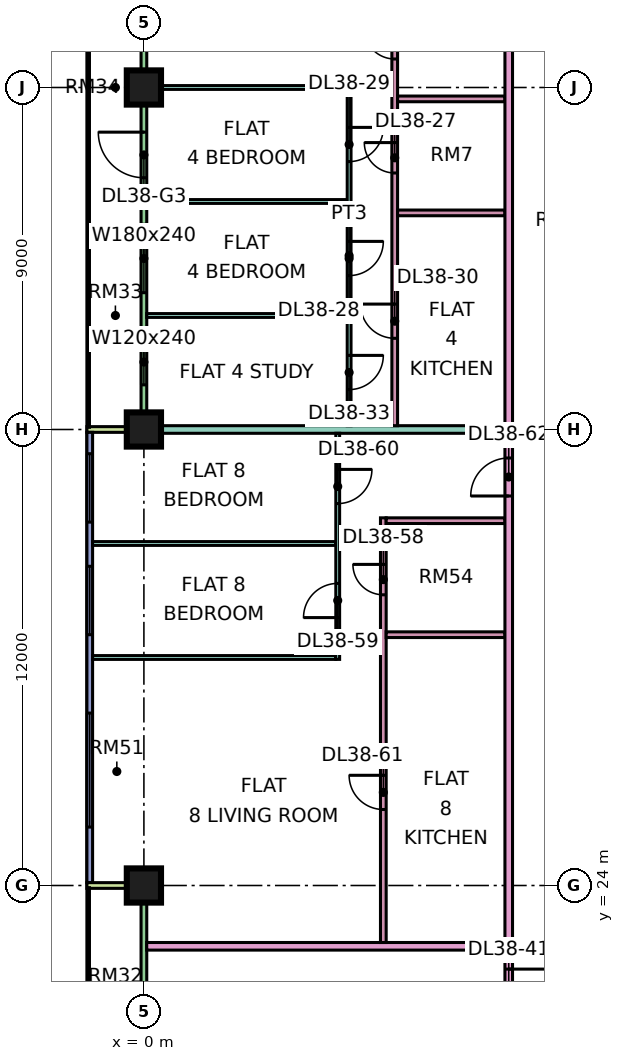
"""IFC4 building model, lengths in metres.
Left out: names, types, materials, properties, quantities, classifications, styles, units other than length and angle.
Written with IfcOpenShell. Run it as: python <this file> out.ifc"""

import sys

from ifc_helpers import new_model, si_unit, direction, frame, frame_2d, origin, origin_2d, place, context, subcontext, project, spatial, rectangle, extrude, element, fill, save


model = new_model("IFC4")
c1 = context("Model", 3, precision=1e-05, world=origin(), true_north=direction((0.0, 1.0)))
c2 = subcontext(c1, "Body", "Model", "MODEL_VIEW")
j1 = project(units=[si_unit("LENGTHUNIT", "METRE"), si_unit("PLANEANGLEUNIT", "RADIAN")], contexts=[c1])
p1 = place(None, origin())
s1 = spatial("IfcSite", under=j1, at=p1, CompositionType="ELEMENT")
p2 = place(p1, origin())
s2 = spatial("IfcBuilding", under=s1, at=p2, CompositionType="ELEMENT")
p3 = place(p2, frame((0.0, 0.0, 168.65)))
s3 = spatial("IfcBuildingStorey", under=s2, at=p3, CompositionType="ELEMENT", Elevation=168.65)
p4 = place(p3, frame((0.0, 24.0, 0.0), z_axis=(0.0, 0.0, 1.0), x_axis=(1.0, 0.0, 0.0)))
e1 = element("IfcColumn", 1, at=p4, inside=s3, PredefinedType="COLUMN", context=c2, shape_type="SweptSolid", body=[
    extrude(rectangle(XDim=0.9, YDim=0.9, at=origin_2d()), origin(), (0.0, 0.0, 1.0), 3.75),
])
p5 = place(p3, frame((0.0, 36.0, 0.0), z_axis=(0.0, 0.0, 1.0), x_axis=(1.0, 0.0, 0.0)))
e2 = element("IfcColumn", 2, at=p5, inside=s3, PredefinedType="COLUMN", context=c2, shape_type="SweptSolid", body=[
    extrude(rectangle(XDim=0.9, YDim=0.9, at=origin_2d()), origin(), (0.0, 0.0, 1.0), 3.75),
])
p6 = place(p3, frame((0.0, 45.0, 0.0), z_axis=(0.0, 0.0, 1.0), x_axis=(1.0, 0.0, 0.0)))
e3 = element("IfcColumn", 3, at=p6, inside=s3, PredefinedType="COLUMN", context=c2, shape_type="SweptSolid", body=[
    extrude(rectangle(XDim=0.9, YDim=0.9, at=origin_2d()), origin(), (0.0, 0.0, 1.0), 3.75),
])
p7 = place(p3, frame((0.0, 47.925, 0.0), z_axis=(0.0, 0.0, 1.0), x_axis=(0.0, -1.0, 0.0)))
e4 = element("IfcWall", 4, at=p7, inside=s3, PredefinedType="SOLIDWALL", context=c2, shape_type="SweptSolid", body=[
    extrude(rectangle(XDim=11.85, YDim=0.15, at=frame_2d((5.925, 0.0))), origin(), (0.0, 0.0, 1.0), 3.35),
])
p8 = place(p7, frame((0.587, 0.0, 0.45)))
e5 = element("IfcOpeningElement", 5, at=p8, cuts=e4, PredefinedType="OPENING", context=c2, shape_type="SweptSolid", body=[
    extrude(rectangle(XDim=1.2, YDim=2.4, at=frame_2d((0.6, 1.2))), frame((0.0, 0.085, 0.0), z_axis=(0.0, -1.0, 0.0), x_axis=(1.0, 0.0, 0.0)), (0.0, 0.0, 1.0), 0.17),
])
p9 = place(p7, frame((4.1, 0.0, 0.0)))
e6 = element("IfcOpeningElement", 6, at=p9, cuts=e4, PredefinedType="OPENING", context=c2, shape_type="SweptSolid", body=[
    extrude(rectangle(XDim=1.2, YDim=2.4, at=frame_2d((0.6, 1.2))), frame((0.0, 0.085, 0.0), z_axis=(0.0, -1.0, 0.0), x_axis=(1.0, 0.0, 0.0)), (0.0, 0.0, 1.0), 0.17),
])
p10 = place(p7, frame((6.525, 0.0, 0.45)))
e7 = element("IfcOpeningElement", 7, at=p10, cuts=e4, PredefinedType="OPENING", context=c2, shape_type="SweptSolid", body=[
    extrude(rectangle(XDim=1.8, YDim=2.4, at=frame_2d((0.9, 1.2))), frame((0.0, 0.085, 0.0), z_axis=(0.0, -1.0, 0.0), x_axis=(1.0, 0.0, 0.0)), (0.0, 0.0, 1.0), 0.17),
])
p11 = place(p7, frame((9.55, 0.0, 0.45)))
e8 = element("IfcOpeningElement", 8, at=p11, cuts=e4, PredefinedType="OPENING", context=c2, shape_type="SweptSolid", body=[
    extrude(rectangle(XDim=1.2, YDim=2.4, at=frame_2d((0.6, 1.2))), frame((0.0, 0.085, 0.0), z_axis=(0.0, -1.0, 0.0), x_axis=(1.0, 0.0, 0.0)), (0.0, 0.0, 1.0), 0.17),
])
p12 = place(p3, frame((-1.5, 36.0, 0.0), z_axis=(0.0, 0.0, 1.0), x_axis=(1.0, 0.0, 0.0)))
e9 = element("IfcWall", 9, at=p12, inside=s3, PredefinedType="SOLIDWALL", context=c2, shape_type="SweptSolid", body=[
    extrude(rectangle(XDim=1.5, YDim=0.15, at=frame_2d((0.75, 0.0))), origin(), (0.0, 0.0, 1.0), 3.35),
])
p13 = place(p3, frame((-1.425, 35.925, 0.0), z_axis=(0.0, 0.0, 1.0), x_axis=(0.0, -1.0, 0.0)))
e10 = element("IfcWall", 10, at=p13, inside=s3, PredefinedType="SOLIDWALL", context=c2, shape_type="SweptSolid", body=[
    extrude(rectangle(XDim=11.85, YDim=0.15, at=frame_2d((5.925, 0.0))), origin(), (0.0, 0.0, 1.0), 3.35),
])
p14 = place(p13, frame((0.562, 0.0, 0.45)))
e11 = element("IfcOpeningElement", 11, at=p14, cuts=e10, PredefinedType="OPENING", context=c2, shape_type="SweptSolid", body=[
    extrude(rectangle(XDim=1.8, YDim=2.4, at=frame_2d((0.9, 1.2))), frame((0.0, 0.085, 0.0), z_axis=(0.0, -1.0, 0.0), x_axis=(1.0, 0.0, 0.0)), (0.0, 0.0, 1.0), 0.17),
])
p15 = place(p13, frame((3.525, 0.0, 0.45)))
e12 = element("IfcOpeningElement", 12, at=p15, cuts=e10, PredefinedType="OPENING", context=c2, shape_type="SweptSolid", body=[
    extrude(rectangle(XDim=1.8, YDim=2.4, at=frame_2d((0.9, 1.2))), frame((0.0, 0.085, 0.0), z_axis=(0.0, -1.0, 0.0), x_axis=(1.0, 0.0, 0.0)), (0.0, 0.0, 1.0), 0.17),
])
p16 = place(p13, frame((7.387, 0.0, 0.45)))
e13 = element("IfcOpeningElement", 13, at=p16, cuts=e10, PredefinedType="OPENING", context=c2, shape_type="SweptSolid", body=[
    extrude(rectangle(XDim=3.0, YDim=2.4, at=frame_2d((1.5, 1.2))), frame((0.0, 0.085, 0.0), z_axis=(0.0, -1.0, 0.0), x_axis=(1.0, 0.0, 0.0)), (0.0, 0.0, 1.0), 0.17),
])
p17 = place(p3, frame((0.0, 23.925, 0.0), z_axis=(0.0, 0.0, 1.0), x_axis=(0.0, -1.0, 0.0)))
e14 = element("IfcWall", 14, at=p17, inside=s3, PredefinedType="SOLIDWALL", context=c2, shape_type="SweptSolid", body=[
    extrude(rectangle(XDim=11.35, YDim=0.15, at=frame_2d((5.675, 0.0))), origin(), (0.0, 0.0, 1.0), 3.35),
])
p18 = place(p17, frame((6.738, 0.0, 0.0)))
e15 = element("IfcOpeningElement", 15, at=p18, cuts=e14, PredefinedType="OPENING", context=c2, shape_type="SweptSolid", body=[
    extrude(rectangle(XDim=1.8, YDim=2.4, at=frame_2d((0.9, 1.2))), frame((0.0, 0.085, 0.0), z_axis=(0.0, -1.0, 0.0), x_axis=(1.0, 0.0, 0.0)), (0.0, 0.0, 1.0), 0.17),
])
p19 = place(p3, frame((-1.5, 24.0, 0.0), z_axis=(0.0, 0.0, 1.0), x_axis=(1.0, 0.0, 0.0)))
e16 = element("IfcWall", 16, at=p19, inside=s3, PredefinedType="SOLIDWALL", context=c2, shape_type="SweptSolid", body=[
    extrude(rectangle(XDim=1.5, YDim=0.15, at=frame_2d((0.75, 0.0))), origin(), (0.0, 0.0, 1.0), 3.35),
])
p20 = place(p3, frame((-1.351, 33.0, 0.0), z_axis=(0.0, 0.0, 1.0), x_axis=(1.0, 0.0, 0.0)))
e17 = element("IfcWall", 17, at=p20, inside=s3, PredefinedType="PARTITIONING", context=c2, shape_type="SweptSolid", body=[
    extrude(rectangle(XDim=6.401, YDim=0.1, at=frame_2d((3.201, 0.0))), origin(), (0.0, 0.0, 1.0), 3.35),
])
p21 = place(p3, frame((-1.35, 30.0, 0.0), z_axis=(0.0, 0.0, 1.0), x_axis=(1.0, 0.0, 0.0)))
e18 = element("IfcWall", 18, at=p21, inside=s3, PredefinedType="PARTITIONING", context=c2, shape_type="SweptSolid", body=[
    extrude(rectangle(XDim=6.4, YDim=0.1, at=frame_2d((3.2, 0.0))), origin(), (0.0, 0.0, 1.0), 3.35),
])
e19 = element("IfcWall", 19, at=p5, inside=s3, PredefinedType="PARTITIONING", context=c2, shape_type="SweptSolid", body=[
    extrude(rectangle(XDim=9.5, YDim=0.2, at=frame_2d((4.75, 0.0))), origin(), (0.0, 0.0, 1.0), 3.35),
])
p22 = place(p3, frame((0.074, 22.4, 0.0), z_axis=(0.0, 0.0, 1.0), x_axis=(1.0, 0.0, 0.0)))
e20 = element("IfcWall", 20, at=p22, inside=s3, PredefinedType="PARTITIONING", context=c2, shape_type="SweptSolid", body=[
    extrude(rectangle(XDim=9.426, YDim=0.2, at=frame_2d((4.713, 0.0))), origin(), (0.0, 0.0, 1.0), 3.35),
])
for number, where, z_axis, x_axis in (
    (21, (0.074, 39.0, 0.0), (0.0, 0.0, 1.0), (1.0, 0.0, 0.0)),
    (22, (0.074, 42.0, 0.0), (0.0, 0.0, 1.0), (1.0, 0.0, 0.0)),
    (23, (0.074, 45.0, 0.0), (0.0, 0.0, 1.0), (1.0, 0.0, 0.0)),
):
    element("IfcWall", number, at=place(p3, frame(where, z_axis=z_axis, x_axis=x_axis)), inside=s3, PredefinedType="PARTITIONING", context=c2, shape_type="SweptSolid", body=[
        extrude(rectangle(XDim=5.276, YDim=0.1, at=frame_2d((2.638, 0.0))), origin(), (0.0, 0.0, 1.0), 3.35),
    ])
p23 = place(p3, frame((5.1, 29.95, 0.0), z_axis=(0.0, 0.0, 1.0), x_axis=(0.0, 1.0, 0.0)))
e24 = element("IfcWall", 24, at=p23, inside=s3, PredefinedType="PARTITIONING", context=c2, shape_type="SweptSolid", body=[
    extrude(rectangle(XDim=5.95, YDim=0.1, at=frame_2d((2.975, 0.0))), origin(), (0.0, 0.0, 1.0), 3.35),
])
p24 = place(p23, frame((1.1, 0.0, 0.0)))
e25 = element("IfcOpeningElement", 25, at=p24, cuts=e24, PredefinedType="OPENING", context=c2, shape_type="SweptSolid", body=[
    extrude(rectangle(XDim=0.9, YDim=2.1, at=frame_2d((0.45, 1.05))), frame((0.0, 0.06, 0.0), z_axis=(0.0, -1.0, 0.0), x_axis=(1.0, 0.0, 0.0)), (0.0, 0.0, 1.0), 0.12),
])
p25 = place(p23, frame((4.1, 0.0, 0.0)))
e26 = element("IfcOpeningElement", 26, at=p25, cuts=e24, PredefinedType="OPENING", context=c2, shape_type="SweptSolid", body=[
    extrude(rectangle(XDim=0.9, YDim=2.1, at=frame_2d((0.45, 1.05))), frame((0.0, 0.06, 0.0), z_axis=(0.0, -1.0, 0.0), x_axis=(1.0, 0.0, 0.0)), (0.0, 0.0, 1.0), 0.12),
])
p26 = place(p3, frame((5.4, 36.1, 0.0), z_axis=(0.0, 0.0, 1.0), x_axis=(0.0, 1.0, 0.0)))
e27 = element("IfcWall", 27, at=p26, inside=s3, PredefinedType="PARTITIONING", context=c2, shape_type="SweptSolid", body=[
    extrude(rectangle(XDim=8.95, YDim=0.1, at=frame_2d((4.475, 0.0))), origin(), (0.0, 0.0, 1.0), 3.35),
])
p27 = place(p26, frame((3.95, 0.0, 0.0)))
e28 = element("IfcOpeningElement", 28, at=p27, cuts=e27, PredefinedType="OPENING", context=c2, shape_type="SweptSolid", body=[
    extrude(rectangle(XDim=0.9, YDim=2.1, at=frame_2d((0.45, 1.05))), frame((0.0, 0.06, 0.0), z_axis=(0.0, -1.0, 0.0), x_axis=(1.0, 0.0, 0.0)), (0.0, 0.0, 1.0), 0.12),
])
p28 = place(p26, frame((6.95, 0.0, 0.0)))
e29 = element("IfcOpeningElement", 29, at=p28, cuts=e27, PredefinedType="OPENING", context=c2, shape_type="SweptSolid", body=[
    extrude(rectangle(XDim=0.9, YDim=2.1, at=frame_2d((0.45, 1.05))), frame((0.0, 0.06, 0.0), z_axis=(0.0, -1.0, 0.0), x_axis=(1.0, 0.0, 0.0)), (0.0, 0.0, 1.0), 0.12),
])
p29 = place(p26, frame((0.95, 0.0, 0.0)))
e30 = element("IfcOpeningElement", 30, at=p29, cuts=e27, PredefinedType="OPENING", context=c2, shape_type="SweptSolid", body=[
    extrude(rectangle(XDim=0.9, YDim=2.1, at=frame_2d((0.45, 1.05))), frame((0.0, 0.06, 0.0), z_axis=(0.0, -1.0, 0.0), x_axis=(1.0, 0.0, 0.0)), (0.0, 0.0, 1.0), 0.12),
])
p30 = place(p3, frame((6.3, 22.5, 0.0), z_axis=(0.0, 0.0, 1.0), x_axis=(0.0, 1.0, 0.0)))
e31 = element("IfcWall", 31, at=p30, inside=s3, PredefinedType="PARTITIONING", context=c2, shape_type="SweptSolid", body=[
    extrude(rectangle(XDim=11.175, YDim=0.15, at=frame_2d((5.587, 0.0))), origin(), (0.0, 0.0, 1.0), 3.35),
])
p31 = place(p30, frame((9.15, 0.0, 0.0)))
e32 = element("IfcOpeningElement", 32, at=p31, cuts=e31, PredefinedType="OPENING", context=c2, shape_type="SweptSolid", body=[
    extrude(rectangle(XDim=0.8, YDim=2.1, at=frame_2d((0.4, 1.05))), frame((0.0, 0.085, 0.0), z_axis=(0.0, -1.0, 0.0), x_axis=(1.0, 0.0, 0.0)), (0.0, 0.0, 1.0), 0.17),
])
p32 = place(p30, frame((3.5, 0.0, 0.0)))
e33 = element("IfcOpeningElement", 33, at=p32, cuts=e31, PredefinedType="OPENING", context=c2, shape_type="SweptSolid", body=[
    extrude(rectangle(XDim=0.9, YDim=2.1, at=frame_2d((0.45, 1.05))), frame((0.0, 0.085, 0.0), z_axis=(0.0, -1.0, 0.0), x_axis=(1.0, 0.0, 0.0)), (0.0, 0.0, 1.0), 0.17),
])
for number, where, z_axis, x_axis in (
    (34, (6.375, 30.6, 0.0), (0.0, 0.0, 1.0), (1.0, 0.0, 0.0)),
    (35, (6.375, 33.6, 0.0), (0.0, 0.0, 1.0), (1.0, 0.0, 0.0)),
):
    element("IfcWall", number, at=place(p3, frame(where, z_axis=z_axis, x_axis=x_axis)), inside=s3, PredefinedType="PARTITIONING", context=c2, shape_type="SweptSolid", body=[
        extrude(rectangle(XDim=3.125, YDim=0.15, at=frame_2d((1.562, 0.0))), origin(), (0.0, 0.0, 1.0), 3.35),
    ])
p33 = place(p3, frame((6.6, 36.1, 0.0), z_axis=(0.0, 0.0, 1.0), x_axis=(0.0, 1.0, 0.0)))
e36 = element("IfcWall", 36, at=p33, inside=s3, PredefinedType="PARTITIONING", context=c2, shape_type="SweptSolid", body=[
    extrude(rectangle(XDim=11.675, YDim=0.15, at=frame_2d((5.837, 0.0))), origin(), (0.0, 0.0, 1.0), 3.35),
])
p34 = place(p33, frame((6.65, 0.0, 0.0)))
e37 = element("IfcOpeningElement", 37, at=p34, cuts=e36, PredefinedType="OPENING", context=c2, shape_type="SweptSolid", body=[
    extrude(rectangle(XDim=0.8, YDim=2.1, at=frame_2d((0.4, 1.05))), frame((0.0, 0.085, 0.0), z_axis=(0.0, -1.0, 0.0), x_axis=(1.0, 0.0, 0.0)), (0.0, 0.0, 1.0), 0.17),
])
p35 = place(p33, frame((2.3, 0.0, 0.0)))
e38 = element("IfcOpeningElement", 38, at=p35, cuts=e36, PredefinedType="OPENING", context=c2, shape_type="SweptSolid", body=[
    extrude(rectangle(XDim=0.9, YDim=2.1, at=frame_2d((0.45, 1.05))), frame((0.0, 0.085, 0.0), z_axis=(0.0, -1.0, 0.0), x_axis=(1.0, 0.0, 0.0)), (0.0, 0.0, 1.0), 0.17),
])
p36 = place(p33, frame((9.65, 0.0, 0.0)))
e39 = element("IfcOpeningElement", 39, at=p36, cuts=e36, PredefinedType="OPENING", context=c2, shape_type="SweptSolid", body=[
    extrude(rectangle(XDim=0.8, YDim=2.1, at=frame_2d((0.4, 1.05))), frame((0.0, 0.085, 0.0), z_axis=(0.0, -1.0, 0.0), x_axis=(1.0, 0.0, 0.0)), (0.0, 0.0, 1.0), 0.17),
])
for number, where, z_axis, x_axis in (
    (40, (6.675, 41.7, 0.0), (0.0, 0.0, 1.0), (1.0, 0.0, 0.0)),
    (41, (6.675, 44.7, 0.0), (0.0, 0.0, 1.0), (1.0, 0.0, 0.0)),
):
    element("IfcWall", number, at=place(p3, frame(where, z_axis=z_axis, x_axis=x_axis)), inside=s3, PredefinedType="PARTITIONING", context=c2, shape_type="SweptSolid", body=[
        extrude(rectangle(XDim=2.825, YDim=0.15, at=frame_2d((1.413, 0.0))), origin(), (0.0, 0.0, 1.0), 3.35),
    ])
p37 = place(p3, frame((9.6, 20.0, 0.0), z_axis=(0.0, 0.0, 1.0), x_axis=(0.0, 1.0, 0.0)))
e42 = element("IfcWall", 42, at=p37, inside=s3, PredefinedType="PARTITIONING", context=c2, shape_type="SweptSolid", body=[
    extrude(rectangle(XDim=44.35, YDim=0.2, at=frame_2d((22.175, 0.0))), origin(), (0.0, 0.0, 1.0), 3.35),
])
p38 = place(p37, frame((28.8, 0.0, 0.0)))
e43 = element("IfcOpeningElement", 43, at=p38, cuts=e42, PredefinedType="OPENING", context=c2, shape_type="SweptSolid", body=[
    extrude(rectangle(XDim=1.0, YDim=2.1, at=frame_2d((0.5, 1.05))), frame((0.0, 0.11, 0.0), z_axis=(0.0, -1.0, 0.0), x_axis=(1.0, 0.0, 0.0)), (0.0, 0.0, 1.0), 0.22),
])
p39 = place(p37, frame((32.1, 0.0, 0.0)))
e44 = element("IfcOpeningElement", 44, at=p39, cuts=e42, PredefinedType="OPENING", context=c2, shape_type="SweptSolid", body=[
    extrude(rectangle(XDim=1.0, YDim=2.1, at=frame_2d((0.5, 1.05))), frame((0.0, 0.11, 0.0), z_axis=(0.0, -1.0, 0.0), x_axis=(1.0, 0.0, 0.0)), (0.0, 0.0, 1.0), 0.22),
])
p40 = place(p37, frame((0.6, 0.0, 0.0)))
e45 = element("IfcOpeningElement", 45, at=p40, cuts=e42, PredefinedType="OPENING", context=c2, shape_type="SweptSolid", body=[
    extrude(rectangle(XDim=1.2, YDim=2.1, at=frame_2d((0.6, 1.05))), frame((0.0, 0.11, 0.0), z_axis=(0.0, -1.0, 0.0), x_axis=(1.0, 0.0, 0.0)), (0.0, 0.0, 1.0), 0.22),
])
p41 = place(p37, frame((14.25, 0.0, 0.0)))
e46 = element("IfcOpeningElement", 46, at=p41, cuts=e42, PredefinedType="OPENING", context=c2, shape_type="SweptSolid", body=[
    extrude(rectangle(XDim=1.0, YDim=2.1, at=frame_2d((0.5, 1.05))), frame((0.0, 0.11, 0.0), z_axis=(0.0, -1.0, 0.0), x_axis=(1.0, 0.0, 0.0)), (0.0, 0.0, 1.0), 0.22),
])
p42 = place(p9, frame((1.2, 0.0, 0.0), z_axis=(0.0, 0.0, 1.0), x_axis=(-1.0, 0.0, 0.0)))
e47 = element("IfcDoor", 47, at=p42, inside=s3, OperationType="DOUBLE_DOOR_SINGLE_SWING", PredefinedType="DOOR", context=c2, shape_type="SweptSolid", body=[
    extrude(rectangle(XDim=1.2, YDim=2.4, at=frame_2d((0.6, 1.2))), frame((0.0, 0.025, 0.0), z_axis=(0.0, -1.0, 0.0), x_axis=(1.0, 0.0, 0.0)), (0.0, 0.0, 1.0), 0.05),
])
fill(e6, e47)
p43 = place(p10, origin())
e48 = element("IfcWindow", 48, at=p43, inside=s3, PartitioningType="SINGLE_PANEL", PredefinedType="WINDOW", context=c2, shape_type="SweptSolid", body=[
    extrude(rectangle(XDim=1.8, YDim=2.4, at=frame_2d((0.9, 1.2))), frame((0.0, 0.03, 0.0), z_axis=(0.0, -1.0, 0.0), x_axis=(1.0, 0.0, 0.0)), (0.0, 0.0, 1.0), 0.06),
])
fill(e7, e48)
p44 = place(p11, origin())
e49 = element("IfcWindow", 49, at=p44, inside=s3, PartitioningType="SINGLE_PANEL", PredefinedType="WINDOW", context=c2, shape_type="SweptSolid", body=[
    extrude(rectangle(XDim=1.2, YDim=2.4, at=frame_2d((0.6, 1.2))), frame((0.0, 0.03, 0.0), z_axis=(0.0, -1.0, 0.0), x_axis=(1.0, 0.0, 0.0)), (0.0, 0.0, 1.0), 0.06),
])
fill(e8, e49)
p45 = place(p14, origin())
e50 = element("IfcWindow", 50, at=p45, inside=s3, PartitioningType="SINGLE_PANEL", PredefinedType="WINDOW", context=c2, shape_type="SweptSolid", body=[
    extrude(rectangle(XDim=1.8, YDim=2.4, at=frame_2d((0.9, 1.2))), frame((0.0, 0.03, 0.0), z_axis=(0.0, -1.0, 0.0), x_axis=(1.0, 0.0, 0.0)), (0.0, 0.0, 1.0), 0.06),
])
fill(e11, e50)
p46 = place(p15, origin())
e51 = element("IfcWindow", 51, at=p46, inside=s3, PartitioningType="SINGLE_PANEL", PredefinedType="WINDOW", context=c2, shape_type="SweptSolid", body=[
    extrude(rectangle(XDim=1.8, YDim=2.4, at=frame_2d((0.9, 1.2))), frame((0.0, 0.03, 0.0), z_axis=(0.0, -1.0, 0.0), x_axis=(1.0, 0.0, 0.0)), (0.0, 0.0, 1.0), 0.06),
])
fill(e12, e51)
p47 = place(p16, origin())
e52 = element("IfcWindow", 52, at=p47, inside=s3, PartitioningType="SINGLE_PANEL", PredefinedType="WINDOW", context=c2, shape_type="SweptSolid", body=[
    extrude(rectangle(XDim=3.0, YDim=2.4, at=frame_2d((1.5, 1.2))), frame((0.0, 0.03, 0.0), z_axis=(0.0, -1.0, 0.0), x_axis=(1.0, 0.0, 0.0)), (0.0, 0.0, 1.0), 0.06),
])
fill(e13, e52)
p48 = place(p34, frame((0.8, 0.0, 0.0), z_axis=(0.0, 0.0, 1.0), x_axis=(-1.0, 0.0, 0.0)))
e53 = element("IfcDoor", 53, at=p48, inside=s3, OperationType="SINGLE_SWING_RIGHT", PredefinedType="DOOR", context=c2, shape_type="SweptSolid", body=[
    extrude(rectangle(XDim=0.8, YDim=2.1, at=frame_2d((0.4, 1.05))), frame((0.0, 0.025, 0.0), z_axis=(0.0, -1.0, 0.0), x_axis=(1.0, 0.0, 0.0)), (0.0, 0.0, 1.0), 0.05),
])
fill(e37, e53)
p49 = place(p27, origin())
e54 = element("IfcDoor", 54, at=p49, inside=s3, OperationType="SINGLE_SWING_RIGHT", PredefinedType="DOOR", context=c2, shape_type="SweptSolid", body=[
    extrude(rectangle(XDim=0.9, YDim=2.1, at=frame_2d((0.45, 1.05))), frame((0.0, 0.025, 0.0), z_axis=(0.0, -1.0, 0.0), x_axis=(1.0, 0.0, 0.0)), (0.0, 0.0, 1.0), 0.05),
])
fill(e28, e54)
p50 = place(p28, origin())
e55 = element("IfcDoor", 55, at=p50, inside=s3, OperationType="SINGLE_SWING_RIGHT", PredefinedType="DOOR", context=c2, shape_type="SweptSolid", body=[
    extrude(rectangle(XDim=0.9, YDim=2.1, at=frame_2d((0.45, 1.05))), frame((0.0, 0.025, 0.0), z_axis=(0.0, -1.0, 0.0), x_axis=(1.0, 0.0, 0.0)), (0.0, 0.0, 1.0), 0.05),
])
fill(e29, e55)
p51 = place(p35, frame((0.9, 0.0, 0.0), z_axis=(0.0, 0.0, 1.0), x_axis=(-1.0, 0.0, 0.0)))
e56 = element("IfcDoor", 56, at=p51, inside=s3, OperationType="SINGLE_SWING_RIGHT", PredefinedType="DOOR", context=c2, shape_type="SweptSolid", body=[
    extrude(rectangle(XDim=0.9, YDim=2.1, at=frame_2d((0.45, 1.05))), frame((0.0, 0.025, 0.0), z_axis=(0.0, -1.0, 0.0), x_axis=(1.0, 0.0, 0.0)), (0.0, 0.0, 1.0), 0.05),
])
fill(e38, e56)
p52 = place(p36, frame((0.8, 0.0, 0.0), z_axis=(0.0, 0.0, 1.0), x_axis=(-1.0, 0.0, 0.0)))
e57 = element("IfcDoor", 57, at=p52, inside=s3, OperationType="SINGLE_SWING_RIGHT", PredefinedType="DOOR", context=c2, shape_type="SweptSolid", body=[
    extrude(rectangle(XDim=0.8, YDim=2.1, at=frame_2d((0.4, 1.05))), frame((0.0, 0.025, 0.0), z_axis=(0.0, -1.0, 0.0), x_axis=(1.0, 0.0, 0.0)), (0.0, 0.0, 1.0), 0.05),
])
fill(e39, e57)
p53 = place(p29, origin())
e58 = element("IfcDoor", 58, at=p53, inside=s3, OperationType="SINGLE_SWING_RIGHT", PredefinedType="DOOR", context=c2, shape_type="SweptSolid", body=[
    extrude(rectangle(XDim=0.9, YDim=2.1, at=frame_2d((0.45, 1.05))), frame((0.0, 0.025, 0.0), z_axis=(0.0, -1.0, 0.0), x_axis=(1.0, 0.0, 0.0)), (0.0, 0.0, 1.0), 0.05),
])
fill(e30, e58)
p54 = place(p40, origin())
e59 = element("IfcDoor", 59, at=p54, inside=s3, OperationType="SINGLE_SWING_RIGHT", PredefinedType="DOOR", context=c2, shape_type="SweptSolid", body=[
    extrude(rectangle(XDim=1.2, YDim=2.1, at=frame_2d((0.6, 1.05))), frame((0.0, 0.025, 0.0), z_axis=(0.0, -1.0, 0.0), x_axis=(1.0, 0.0, 0.0)), (0.0, 0.0, 1.0), 0.05),
])
fill(e45, e59)
p55 = place(p31, frame((0.8, 0.0, 0.0), z_axis=(0.0, 0.0, 1.0), x_axis=(-1.0, 0.0, 0.0)))
e60 = element("IfcDoor", 60, at=p55, inside=s3, OperationType="SINGLE_SWING_RIGHT", PredefinedType="DOOR", context=c2, shape_type="SweptSolid", body=[
    extrude(rectangle(XDim=0.8, YDim=2.1, at=frame_2d((0.4, 1.05))), frame((0.0, 0.025, 0.0), z_axis=(0.0, -1.0, 0.0), x_axis=(1.0, 0.0, 0.0)), (0.0, 0.0, 1.0), 0.05),
])
fill(e32, e60)
p56 = place(p24, origin())
e61 = element("IfcDoor", 61, at=p56, inside=s3, OperationType="SINGLE_SWING_LEFT", PredefinedType="DOOR", context=c2, shape_type="SweptSolid", body=[
    extrude(rectangle(XDim=0.9, YDim=2.1, at=frame_2d((0.45, 1.05))), frame((0.0, 0.025, 0.0), z_axis=(0.0, -1.0, 0.0), x_axis=(1.0, 0.0, 0.0)), (0.0, 0.0, 1.0), 0.05),
])
fill(e25, e61)
p57 = place(p25, origin())
e62 = element("IfcDoor", 62, at=p57, inside=s3, OperationType="SINGLE_SWING_RIGHT", PredefinedType="DOOR", context=c2, shape_type="SweptSolid", body=[
    extrude(rectangle(XDim=0.9, YDim=2.1, at=frame_2d((0.45, 1.05))), frame((0.0, 0.025, 0.0), z_axis=(0.0, -1.0, 0.0), x_axis=(1.0, 0.0, 0.0)), (0.0, 0.0, 1.0), 0.05),
])
fill(e26, e62)
p58 = place(p32, frame((0.9, 0.0, 0.0), z_axis=(0.0, 0.0, 1.0), x_axis=(-1.0, 0.0, 0.0)))
e63 = element("IfcDoor", 63, at=p58, inside=s3, OperationType="SINGLE_SWING_RIGHT", PredefinedType="DOOR", context=c2, shape_type="SweptSolid", body=[
    extrude(rectangle(XDim=0.9, YDim=2.1, at=frame_2d((0.45, 1.05))), frame((0.0, 0.025, 0.0), z_axis=(0.0, -1.0, 0.0), x_axis=(1.0, 0.0, 0.0)), (0.0, 0.0, 1.0), 0.05),
])
fill(e33, e63)
p59 = place(p41, origin())
e64 = element("IfcDoor", 64, at=p59, inside=s3, OperationType="SINGLE_SWING_LEFT", PredefinedType="DOOR", context=c2, shape_type="SweptSolid", body=[
    extrude(rectangle(XDim=1.0, YDim=2.1, at=frame_2d((0.5, 1.05))), frame((0.0, 0.025, 0.0), z_axis=(0.0, -1.0, 0.0), x_axis=(1.0, 0.0, 0.0)), (0.0, 0.0, 1.0), 0.05),
])
fill(e46, e64)
save(model, sys.argv[1])
